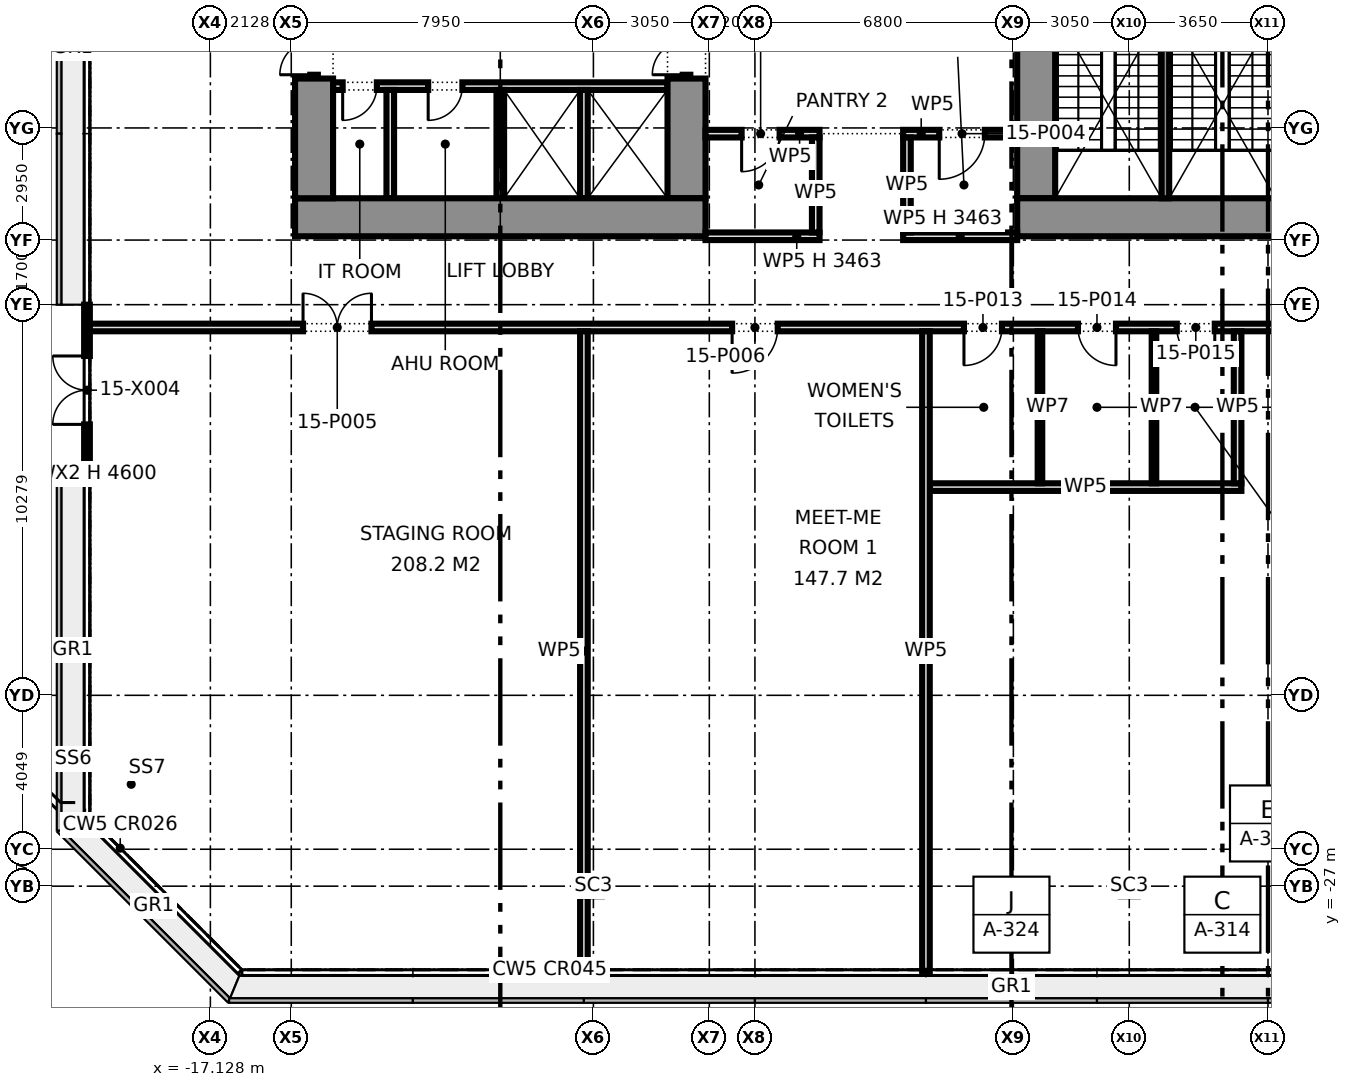
"""IFC4 building model, lengths in metres.
Left out: names, types, materials, properties, quantities, classifications, styles, units other than length and angle.
Written with IfcOpenShell. Run it as: python <this file> out.ifc"""

import sys

from ifc_helpers import new_model, si_unit, direction, frame, frame_2d, origin, origin_2d, place, context, subcontext, project, spatial, rectangle, i_section, extrude, element, fill, save


model = new_model("IFC4")
c1 = context("Model", 3, precision=1e-05, world=origin(), true_north=direction((0.0, 1.0)))
c2 = subcontext(c1, "Body", "Model", "MODEL_VIEW")
j1 = project(units=[si_unit("LENGTHUNIT", "METRE"), si_unit("PLANEANGLEUNIT", "RADIAN")], contexts=[c1])
p1 = place(None, origin())
s1 = spatial("IfcSite", under=j1, at=p1, CompositionType="ELEMENT")
p2 = place(p1, origin())
s2 = spatial("IfcBuilding", under=s1, at=p2, CompositionType="ELEMENT")
p3 = place(p2, frame((0.0, 0.0, 68.6)))
s3 = spatial("IfcBuildingStorey", under=s2, at=p3, CompositionType="ELEMENT", Elevation=68.6)
for number, where, z_axis, x_axis in (
    (1, (-7.05, -27.0, 0.0), (0.0, 0.0, 1.0), (1.0, 0.0, 0.0)),
    (2, (7.05, -27.0, 0.0), (0.0, 0.0, 1.0), (1.0, 0.0, 0.0)),
):
    element("IfcColumn", number, at=place(p3, frame(where, z_axis=z_axis, x_axis=x_axis)), inside=s3, PredefinedType="COLUMN", context=c2, shape_type="SweptSolid", body=[
        extrude(i_section(OverallWidth=0.442, OverallDepth=0.531, WebThickness=0.066, FlangeThickness=0.106, FilletRadius=0.015, at=origin_2d()), origin(), (0.0, 0.0, 1.0), 3.407),
    ])
p4 = place(p3, frame((-20.375, -11.7, 0.0), z_axis=(0.0, 0.0, 1.0), x_axis=(0.0, -1.0, 0.0)))
e3 = element("IfcWall", 3, at=p4, inside=s3, PredefinedType="STANDARD", context=c2, shape_type="SweptSolid", body=[
    extrude(rectangle(XDim=4.565, YDim=0.15, at=frame_2d((2.282, 0.0))), origin(), (0.0, 0.0, 1.0), 4.6),
])
p5 = place(p4, frame((1.35, 0.0, 0.0)))
e4 = element("IfcOpeningElement", 4, at=p5, cuts=e3, PredefinedType="OPENING", context=c2, shape_type="SweptSolid", body=[
    extrude(rectangle(XDim=1.8, YDim=2.1, at=frame_2d((0.9, 1.05))), frame((0.0, 0.085, 0.0), z_axis=(0.0, -1.0, 0.0), x_axis=(1.0, 0.0, 0.0)), (0.0, 0.0, 1.0), 0.17),
])
p6 = place(p3, frame((-14.9, -9.4, 0.0), z_axis=(0.0, 0.0, 1.0), x_axis=(1.0, 0.0, 0.0)))
e5 = element("IfcWall", 5, at=p6, inside=s3, PredefinedType="SHEAR", context=c2, shape_type="SweptSolid", body=[
    extrude(rectangle(XDim=10.8, YDim=1.0, at=frame_2d((5.4, 0.0))), origin(), (0.0, 0.0, 1.0), 4.4),
])
p7 = place(p3, frame((-14.4, -8.9, 0.0), z_axis=(0.0, 0.0, 1.0), x_axis=(0.0, 1.0, 0.0)))
e6 = element("IfcWall", 6, at=p7, inside=s3, PredefinedType="SHEAR", context=c2, shape_type="SweptSolid", body=[
    extrude(rectangle(XDim=3.15, YDim=1.0, at=frame_2d((1.575, 0.0))), origin(), (0.0, 0.0, 1.0), 4.4),
])
p8 = place(p3, frame((-14.4, -5.75, 0.0), z_axis=(0.0, 0.0, 1.0), x_axis=(0.0, 1.0, 0.0)))
e7 = element("IfcWall", 7, at=p8, inside=s3, PredefinedType="PARTITIONING", context=c2, shape_type="SweptSolid", body=[
    extrude(rectangle(XDim=2.0, YDim=0.2, at=frame_2d((1.0, 0.0))), origin(), (0.0, 0.0, 1.0), 2.4),
])
p9 = place(p8, frame((0.1, 0.0, 0.0)))
e8 = element("IfcOpeningElement", 8, at=p9, cuts=e7, PredefinedType="OPENING", context=c2, shape_type="SweptSolid", body=[
    extrude(rectangle(XDim=1.8, YDim=2.1, at=frame_2d((0.9, 1.05))), frame((0.0, 0.11, 0.0), z_axis=(0.0, -1.0, 0.0), x_axis=(1.0, 0.0, 0.0)), (0.0, 0.0, 1.0), 0.22),
])
p10 = place(p3, frame((-4.6, -8.9, 0.0), z_axis=(0.0, 0.0, 1.0), x_axis=(0.0, 1.0, 0.0)))
e9 = element("IfcWall", 9, at=p10, inside=s3, PredefinedType="SHEAR", context=c2, shape_type="SweptSolid", body=[
    extrude(rectangle(XDim=3.15, YDim=1.0, at=frame_2d((1.575, 0.0))), origin(), (0.0, 0.0, 1.0), 4.4),
])
p11 = place(p3, frame((-4.6, -5.75, 0.0), z_axis=(0.0, 0.0, 1.0), x_axis=(0.0, 1.0, 0.0)))
e10 = element("IfcWall", 10, at=p11, inside=s3, PredefinedType="PARTITIONING", context=c2, shape_type="SweptSolid", body=[
    extrude(rectangle(XDim=2.0, YDim=0.2, at=frame_2d((1.0, 0.0))), origin(), (0.0, 0.0, 1.0), 2.4),
])
p12 = place(p11, frame((0.1, 0.0, 0.0)))
e11 = element("IfcOpeningElement", 11, at=p12, cuts=e10, PredefinedType="OPENING", context=c2, shape_type="SweptSolid", body=[
    extrude(rectangle(XDim=1.8, YDim=2.1, at=frame_2d((0.9, 1.05))), frame((0.0, 0.11, 0.0), z_axis=(0.0, -1.0, 0.0), x_axis=(1.0, 0.0, 0.0)), (0.0, 0.0, 1.0), 0.22),
])
p13 = place(p3, frame((-13.9, -5.95, 0.0), z_axis=(0.0, 0.0, 1.0), x_axis=(1.0, 0.0, 0.0)))
e12 = element("IfcWall", 12, at=p13, inside=s3, PredefinedType="PARTITIONING", context=c2, shape_type="SweptSolid", body=[
    extrude(rectangle(XDim=8.8, YDim=0.2, at=frame_2d((4.4, 0.0))), origin(), (0.0, 0.0, 1.0), 4.4),
])
p14 = place(p13, frame((0.252, 0.0, 0.0)))
e13 = element("IfcOpeningElement", 13, at=p14, cuts=e12, PredefinedType="OPENING", context=c2, shape_type="SweptSolid", body=[
    extrude(rectangle(XDim=0.9, YDim=2.1, at=frame_2d((0.45, 1.05))), frame((0.0, 0.11, 0.0), z_axis=(0.0, -1.0, 0.0), x_axis=(1.0, 0.0, 0.0)), (0.0, 0.0, 1.0), 0.22),
])
p15 = place(p13, frame((2.502, 0.0, 0.0)))
e14 = element("IfcOpeningElement", 14, at=p15, cuts=e12, PredefinedType="OPENING", context=c2, shape_type="SweptSolid", body=[
    extrude(rectangle(XDim=0.9, YDim=2.1, at=frame_2d((0.45, 1.05))), frame((0.0, 0.11, 0.0), z_axis=(0.0, -1.0, 0.0), x_axis=(1.0, 0.0, 0.0)), (0.0, 0.0, 1.0), 0.22),
])
for number, where, z_axis, x_axis in (
    (15, (-9.5, -8.9, 0.0), (0.0, 0.0, 1.0), (0.0, 1.0, 0.0)),
    (16, (-7.3, -8.9, 0.0), (0.0, 0.0, 1.0), (0.0, 1.0, 0.0)),
    (17, (-12.395, -8.9, 0.0), (0.0, 0.0, 1.0), (0.0, 1.0, 0.0)),
):
    element("IfcWall", number, at=place(p3, frame(where, z_axis=z_axis, x_axis=x_axis)), inside=s3, PredefinedType="PARTITIONING", context=c2, shape_type="SweptSolid", body=[
        extrude(rectangle(XDim=2.85, YDim=0.2, at=frame_2d((1.425, 0.0))), origin(), (0.0, 0.0, 1.0), 4.4),
    ])
p16 = place(p3, frame((14.9, -9.4, 0.0), z_axis=(0.0, 0.0, 1.0), x_axis=(-1.0, 0.0, 0.0)))
e18 = element("IfcWall", 18, at=p16, inside=s3, PredefinedType="SHEAR", context=c2, shape_type="SweptSolid", body=[
    extrude(rectangle(XDim=10.8, YDim=1.0, at=frame_2d((5.4, 0.0))), origin(), (0.0, 0.0, 1.0), 4.4),
])
p17 = place(p3, frame((4.6, -1.55, 0.0), z_axis=(0.0, 0.0, 1.0), x_axis=(0.0, -1.0, 0.0)))
e19 = element("IfcWall", 19, at=p17, inside=s3, PredefinedType="SHEAR", context=c2, shape_type="SweptSolid", body=[
    extrude(rectangle(XDim=7.35, YDim=1.0, at=frame_2d((3.675, 0.0))), origin(), (0.0, 0.0, 1.0), 4.4),
])
p18 = place(p3, frame((8.0, -2.38, 0.0), z_axis=(0.0, 0.0, 1.0), x_axis=(0.0, -1.0, 0.0)))
e20 = element("IfcWall", 20, at=p18, inside=s3, PredefinedType="SHEAR", context=c2, shape_type="SweptSolid", body=[
    extrude(rectangle(XDim=6.52, YDim=0.2, at=frame_2d((3.26, 0.0))), origin(), (0.0, 0.0, 1.0), 4.4),
])
p19 = place(p3, frame((1.8, -16.5, 0.0), z_axis=(0.0, 0.0, 1.0), x_axis=(1.0, 0.0, 0.0)))
e21 = element("IfcWall", 21, at=p19, inside=s3, PredefinedType="PARTITIONING", context=c2, shape_type="SweptSolid", body=[
    extrude(rectangle(XDim=8.2, YDim=0.2, at=frame_2d((4.1, 0.0))), origin(), (0.0, 0.0, 1.0), 4.4),
])
p20 = place(p3, frame((-20.33, -12.3, 0.0), z_axis=(0.0, 0.0, 1.0), x_axis=(1.0, 0.0, 0.0)))
e22 = element("IfcWall", 22, at=p20, inside=s3, PredefinedType="PARTITIONING", context=c2, shape_type="SweptSolid", body=[
    extrude(rectangle(XDim=48.56, YDim=0.2, at=frame_2d((24.28, 0.0))), origin(), (0.0, 0.0, 1.0), 4.4),
])
p21 = place(p20, frame((5.64, 0.0, 0.0)))
e23 = element("IfcOpeningElement", 23, at=p21, cuts=e22, PredefinedType="OPENING", context=c2, shape_type="SweptSolid", body=[
    extrude(rectangle(XDim=1.8, YDim=2.1, at=frame_2d((0.9, 1.05))), frame((0.0, 0.11, 0.0), z_axis=(0.0, -1.0, 0.0), x_axis=(1.0, 0.0, 0.0)), (0.0, 0.0, 1.0), 0.22),
])
p22 = place(p20, frame((16.93, 0.0, 0.0)))
e24 = element("IfcOpeningElement", 24, at=p22, cuts=e22, PredefinedType="OPENING", context=c2, shape_type="SweptSolid", body=[
    extrude(rectangle(XDim=1.2, YDim=2.1, at=frame_2d((0.6, 1.05))), frame((0.0, 0.11, 0.0), z_axis=(0.0, -1.0, 0.0), x_axis=(1.0, 0.0, 0.0)), (0.0, 0.0, 1.0), 0.22),
])
p23 = place(p20, frame((33.035, 0.0, 0.0)))
e25 = element("IfcOpeningElement", 25, at=p23, cuts=e22, PredefinedType="OPENING", context=c2, shape_type="SweptSolid", body=[
    extrude(rectangle(XDim=1.8, YDim=2.1, at=frame_2d((0.9, 1.05))), frame((0.0, 0.11, 0.0), z_axis=(0.0, -1.0, 0.0), x_axis=(1.0, 0.0, 0.0)), (0.0, 0.0, 1.0), 0.22),
])
p24 = place(p20, frame((23.03, 0.0, 0.0)))
e26 = element("IfcOpeningElement", 26, at=p24, cuts=e22, PredefinedType="OPENING", context=c2, shape_type="SweptSolid", body=[
    extrude(rectangle(XDim=1.0, YDim=2.1, at=frame_2d((0.5, 1.05))), frame((0.0, 0.11, 0.0), z_axis=(0.0, -1.0, 0.0), x_axis=(1.0, 0.0, 0.0)), (0.0, 0.0, 1.0), 0.22),
])
p25 = place(p20, frame((26.03, 0.0, 0.0)))
e27 = element("IfcOpeningElement", 27, at=p25, cuts=e22, PredefinedType="OPENING", context=c2, shape_type="SweptSolid", body=[
    extrude(rectangle(XDim=1.0, YDim=2.1, at=frame_2d((0.5, 1.05))), frame((0.0, 0.11, 0.0), z_axis=(0.0, -1.0, 0.0), x_axis=(1.0, 0.0, 0.0)), (0.0, 0.0, 1.0), 0.22),
])
p26 = place(p20, frame((28.63, 0.0, 0.0)))
e28 = element("IfcOpeningElement", 28, at=p26, cuts=e22, PredefinedType="OPENING", context=c2, shape_type="SweptSolid", body=[
    extrude(rectangle(XDim=1.0, YDim=2.1, at=frame_2d((0.5, 1.05))), frame((0.0, 0.11, 0.0), z_axis=(0.0, -1.0, 0.0), x_axis=(1.0, 0.0, 0.0)), (0.0, 0.0, 1.0), 0.22),
])
for number, where, z_axis, x_axis in (
    (29, (-4.1, -9.9, 0.0), (0.0, 0.0, 1.0), (1.0, 0.0, 0.0)),
    (30, (1.1, -9.9, 0.0), (0.0, 0.0, 1.0), (1.0, 0.0, 0.0)),
):
    element("IfcWall", number, at=place(p3, frame(where, z_axis=z_axis, x_axis=x_axis)), inside=s3, PredefinedType="PARTITIONING", context=c2, shape_type="SweptSolid", body=[
        extrude(rectangle(XDim=3.0, YDim=0.2, at=frame_2d((1.5, 0.0))), origin(), (0.0, 0.0, 1.0), 3.463),
    ])
p27 = place(p3, frame((-4.1, -7.2, 0.0), z_axis=(0.0, 0.0, 1.0), x_axis=(1.0, 0.0, 0.0)))
e31 = element("IfcWall", 31, at=p27, inside=s3, PredefinedType="PARTITIONING", context=c2, shape_type="SweptSolid", body=[
    extrude(rectangle(XDim=3.0, YDim=0.2, at=frame_2d((1.5, 0.0))), origin(), (0.0, 0.0, 1.0), 4.4),
])
p28 = place(p27, frame((0.95, 0.0, 0.0)))
e32 = element("IfcOpeningElement", 32, at=p28, cuts=e31, PredefinedType="OPENING", context=c2, shape_type="SweptSolid", body=[
    extrude(rectangle(XDim=1.0, YDim=2.1, at=frame_2d((0.5, 1.05))), frame((0.0, 0.11, 0.0), z_axis=(0.0, -1.0, 0.0), x_axis=(1.0, 0.0, 0.0)), (0.0, 0.0, 1.0), 0.22),
])
p29 = place(p3, frame((1.1, -7.2, 0.0), z_axis=(0.0, 0.0, 1.0), x_axis=(1.0, 0.0, 0.0)))
e33 = element("IfcWall", 33, at=p29, inside=s3, PredefinedType="PARTITIONING", context=c2, shape_type="SweptSolid", body=[
    extrude(rectangle(XDim=3.0, YDim=0.2, at=frame_2d((1.5, 0.0))), origin(), (0.0, 0.0, 1.0), 4.4),
])
p30 = place(p29, frame((0.95, 0.0, 0.0)))
e34 = element("IfcOpeningElement", 34, at=p30, cuts=e33, PredefinedType="OPENING", context=c2, shape_type="SweptSolid", body=[
    extrude(rectangle(XDim=1.2, YDim=2.1, at=frame_2d((0.6, 1.05))), frame((0.0, 0.11, 0.0), z_axis=(0.0, -1.0, 0.0), x_axis=(1.0, 0.0, 0.0)), (0.0, 0.0, 1.0), 0.22),
])
p31 = place(p3, frame((9.9, -16.4, 0.0), z_axis=(0.0, 0.0, 1.0), x_axis=(0.0, 1.0, 0.0)))
e35 = element("IfcWall", 35, at=p31, inside=s3, PredefinedType="PARTITIONING", context=c2, shape_type="SweptSolid", body=[
    extrude(rectangle(XDim=4.0, YDim=0.2, at=frame_2d((2.0, 0.0))), origin(), (0.0, 0.0, 1.0), 4.4),
])
p32 = place(p3, frame((1.7, -29.23, 0.0), z_axis=(0.0, 0.0, 1.0), x_axis=(0.0, 1.0, 0.0)))
e36 = element("IfcWall", 36, at=p32, inside=s3, PredefinedType="PARTITIONING", context=c2, shape_type="SweptSolid", body=[
    extrude(rectangle(XDim=16.83, YDim=0.2, at=frame_2d((8.415, 0.0))), origin(), (0.0, 0.0, 1.0), 4.4),
])
for number, where, z_axis, x_axis in (
    (37, (1.2, -9.8, 0.0), (0.0, 0.0, 1.0), (0.0, 1.0, 0.0)),
    (38, (-1.2, -9.8, 0.0), (0.0, 0.0, 1.0), (0.0, 1.0, 0.0)),
):
    element("IfcWall", number, at=place(p3, frame(where, z_axis=z_axis, x_axis=x_axis)), inside=s3, PredefinedType="PARTITIONING", context=c2, shape_type="SweptSolid", body=[
        extrude(rectangle(XDim=2.5, YDim=0.2, at=frame_2d((1.25, 0.0))), origin(), (0.0, 0.0, 1.0), 4.4),
    ])
p33 = place(p3, frame((-7.3, -29.23, 0.0), z_axis=(0.0, 0.0, 1.0), x_axis=(0.0, 1.0, 0.0)))
e39 = element("IfcWall", 39, at=p33, inside=s3, PredefinedType="PARTITIONING", context=c2, shape_type="SweptSolid", body=[
    extrude(rectangle(XDim=16.83, YDim=0.2, at=frame_2d((8.415, 0.0))), origin(), (0.0, 0.0, 1.0), 4.4),
])
for number, where, z_axis, x_axis in (
    (40, (7.7, -16.4, 0.0), (0.0, 0.0, 1.0), (0.0, 1.0, 0.0)),
    (41, (4.7, -16.4, 0.0), (0.0, 0.0, 1.0), (0.0, 1.0, 0.0)),
):
    element("IfcWall", number, at=place(p3, frame(where, z_axis=z_axis, x_axis=x_axis)), inside=s3, PredefinedType="PARTITIONING", context=c2, shape_type="SweptSolid", body=[
        extrude(rectangle(XDim=4.0, YDim=0.12, at=frame_2d((2.0, 0.0))), origin(), (0.0, 0.0, 1.0), 4.4),
    ])
p34 = place(p5, frame((1.8, 0.0, 0.0), z_axis=(0.0, 0.0, 1.0), x_axis=(-1.0, 0.0, 0.0)))
e42 = element("IfcDoor", 42, at=p34, inside=s3, OperationType="DOUBLE_DOOR_DOUBLE_SWING", PredefinedType="DOOR", context=c2, shape_type="SweptSolid", body=[
    extrude(rectangle(XDim=1.8, YDim=2.1, at=frame_2d((0.9, 1.05))), frame((0.0, 0.025, 0.0), z_axis=(0.0, -1.0, 0.0), x_axis=(1.0, 0.0, 0.0)), (0.0, 0.0, 1.0), 0.05),
])
fill(e4, e42)
p35 = place(p9, origin())
e43 = element("IfcDoor", 43, at=p35, inside=s3, OperationType="DOUBLE_DOOR_SINGLE_SWING", PredefinedType="DOOR", context=c2, shape_type="SweptSolid", body=[
    extrude(rectangle(XDim=1.8, YDim=2.1, at=frame_2d((0.9, 1.05))), frame((0.0, 0.025, 0.0), z_axis=(0.0, -1.0, 0.0), x_axis=(1.0, 0.0, 0.0)), (0.0, 0.0, 1.0), 0.05),
])
fill(e8, e43)
p36 = place(p12, origin())
e44 = element("IfcDoor", 44, at=p36, inside=s3, OperationType="DOUBLE_DOOR_SINGLE_SWING", PredefinedType="DOOR", context=c2, shape_type="SweptSolid", body=[
    extrude(rectangle(XDim=1.8, YDim=2.1, at=frame_2d((0.9, 1.05))), frame((0.0, 0.025, 0.0), z_axis=(0.0, -1.0, 0.0), x_axis=(1.0, 0.0, 0.0)), (0.0, 0.0, 1.0), 0.05),
])
fill(e11, e44)
p37 = place(p14, frame((0.9, 0.0, 0.0), z_axis=(0.0, 0.0, 1.0), x_axis=(-1.0, 0.0, 0.0)))
e45 = element("IfcDoor", 45, at=p37, inside=s3, OperationType="SINGLE_SWING_RIGHT", PredefinedType="DOOR", context=c2, shape_type="SweptSolid", body=[
    extrude(rectangle(XDim=0.9, YDim=2.1, at=frame_2d((0.45, 1.05))), frame((0.0, 0.025, 0.0), z_axis=(0.0, -1.0, 0.0), x_axis=(1.0, 0.0, 0.0)), (0.0, 0.0, 1.0), 0.05),
])
fill(e13, e45)
p38 = place(p15, frame((0.9, 0.0, 0.0), z_axis=(0.0, 0.0, 1.0), x_axis=(-1.0, 0.0, 0.0)))
e46 = element("IfcDoor", 46, at=p38, inside=s3, OperationType="SINGLE_SWING_RIGHT", PredefinedType="DOOR", context=c2, shape_type="SweptSolid", body=[
    extrude(rectangle(XDim=0.9, YDim=2.1, at=frame_2d((0.45, 1.05))), frame((0.0, 0.025, 0.0), z_axis=(0.0, -1.0, 0.0), x_axis=(1.0, 0.0, 0.0)), (0.0, 0.0, 1.0), 0.05),
])
fill(e14, e46)
p39 = place(p28, frame((1.0, 0.0, 0.0), z_axis=(0.0, 0.0, 1.0), x_axis=(-1.0, 0.0, 0.0)))
e47 = element("IfcDoor", 47, at=p39, inside=s3, OperationType="SINGLE_SWING_RIGHT", PredefinedType="DOOR", context=c2, shape_type="SweptSolid", body=[
    extrude(rectangle(XDim=1.0, YDim=2.1, at=frame_2d((0.5, 1.05))), frame((0.0, 0.025, 0.0), z_axis=(0.0, -1.0, 0.0), x_axis=(1.0, 0.0, 0.0)), (0.0, 0.0, 1.0), 0.05),
])
fill(e32, e47)
p40 = place(p30, frame((1.2, 0.0, 0.0), z_axis=(0.0, 0.0, 1.0), x_axis=(-1.0, 0.0, 0.0)))
e48 = element("IfcDoor", 48, at=p40, inside=s3, OperationType="SINGLE_SWING_RIGHT", PredefinedType="DOOR", context=c2, shape_type="SweptSolid", body=[
    extrude(rectangle(XDim=1.2, YDim=2.1, at=frame_2d((0.6, 1.05))), frame((0.0, 0.025, 0.0), z_axis=(0.0, -1.0, 0.0), x_axis=(1.0, 0.0, 0.0)), (0.0, 0.0, 1.0), 0.05),
])
fill(e34, e48)
p41 = place(p21, origin())
e49 = element("IfcDoor", 49, at=p41, inside=s3, OperationType="DOUBLE_DOOR_SINGLE_SWING", PredefinedType="DOOR", context=c2, shape_type="SweptSolid", body=[
    extrude(rectangle(XDim=1.8, YDim=2.1, at=frame_2d((0.9, 1.05))), frame((0.0, 0.025, 0.0), z_axis=(0.0, -1.0, 0.0), x_axis=(1.0, 0.0, 0.0)), (0.0, 0.0, 1.0), 0.05),
])
fill(e23, e49)
p42 = place(p22, frame((1.2, 0.0, 0.0), z_axis=(0.0, 0.0, 1.0), x_axis=(-1.0, 0.0, 0.0)))
e50 = element("IfcDoor", 50, at=p42, inside=s3, OperationType="SINGLE_SWING_RIGHT", PredefinedType="DOOR", context=c2, shape_type="SweptSolid", body=[
    extrude(rectangle(XDim=1.2, YDim=2.1, at=frame_2d((0.6, 1.05))), frame((0.0, 0.025, 0.0), z_axis=(0.0, -1.0, 0.0), x_axis=(1.0, 0.0, 0.0)), (0.0, 0.0, 1.0), 0.05),
])
fill(e24, e50)
p43 = place(p24, frame((1.0, 0.0, 0.0), z_axis=(0.0, 0.0, 1.0), x_axis=(-1.0, 0.0, 0.0)))
e51 = element("IfcDoor", 51, at=p43, inside=s3, OperationType="SINGLE_SWING_RIGHT", PredefinedType="DOOR", context=c2, shape_type="SweptSolid", body=[
    extrude(rectangle(XDim=1.0, YDim=2.1, at=frame_2d((0.5, 1.05))), frame((0.0, 0.025, 0.0), z_axis=(0.0, -1.0, 0.0), x_axis=(1.0, 0.0, 0.0)), (0.0, 0.0, 1.0), 0.05),
])
fill(e26, e51)
p44 = place(p25, frame((1.0, 0.0, 0.0), z_axis=(0.0, 0.0, 1.0), x_axis=(-1.0, 0.0, 0.0)))
e52 = element("IfcDoor", 52, at=p44, inside=s3, OperationType="SINGLE_SWING_LEFT", PredefinedType="DOOR", context=c2, shape_type="SweptSolid", body=[
    extrude(rectangle(XDim=1.0, YDim=2.1, at=frame_2d((0.5, 1.05))), frame((0.0, 0.025, 0.0), z_axis=(0.0, -1.0, 0.0), x_axis=(1.0, 0.0, 0.0)), (0.0, 0.0, 1.0), 0.05),
])
fill(e27, e52)
p45 = place(p26, frame((1.0, 0.0, 0.0), z_axis=(0.0, 0.0, 1.0), x_axis=(-1.0, 0.0, 0.0)))
e53 = element("IfcDoor", 53, at=p45, inside=s3, OperationType="SINGLE_SWING_LEFT", PredefinedType="DOOR", context=c2, shape_type="SweptSolid", body=[
    extrude(rectangle(XDim=1.0, YDim=2.1, at=frame_2d((0.5, 1.05))), frame((0.0, 0.025, 0.0), z_axis=(0.0, -1.0, 0.0), x_axis=(1.0, 0.0, 0.0)), (0.0, 0.0, 1.0), 0.05),
])
fill(e28, e53)
save(model, sys.argv[1])
